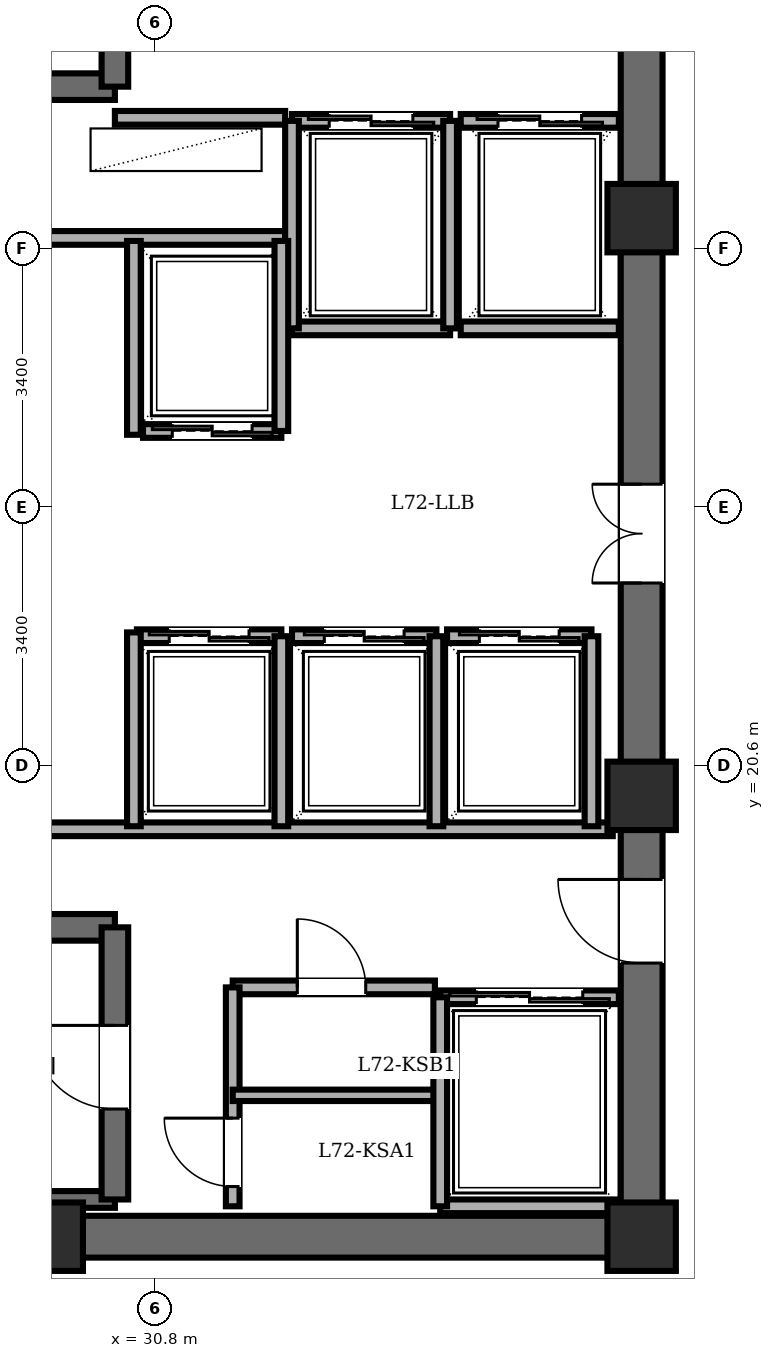
"""IFC4 building model, lengths in metres.
Left out: names, types, materials, properties, quantities, classifications, styles, units other than length and angle.
Written with IfcOpenShell. Run it as: python <this file> out.ifc"""

import sys

from ifc_helpers import new_model, si_unit, direction, frame, frame_2d, origin, origin_2d, place, context, subcontext, project, spatial, rectangle, extrude, element, fill, save


model = new_model("IFC4")
c1 = context("Model", 3, precision=1e-05, world=origin(), true_north=direction((0.0, 1.0)))
c2 = subcontext(c1, "Body", "Model", "MODEL_VIEW")
j1 = project(units=[si_unit("LENGTHUNIT", "METRE"), si_unit("PLANEANGLEUNIT", "RADIAN")], contexts=[c1])
p1 = place(None, origin())
s1 = spatial("IfcSite", under=j1, at=p1, CompositionType="ELEMENT")
p2 = place(p1, origin())
s2 = spatial("IfcBuilding", under=s1, at=p2, CompositionType="ELEMENT")
p3 = place(p2, frame((0.0, 0.0, 277.05)))
s3 = spatial("IfcBuildingStorey", under=s2, at=p3, CompositionType="ELEMENT", Elevation=277.05)
for number, where, z_axis, x_axis in (
    (1, (29.4, 14.4, 0.0), (0.0, 0.0, 1.0), (1.0, 0.0, 0.0)),
    (2, (37.2, 14.4, 0.0), (0.0, 0.0, 1.0), (1.0, 0.0, 0.0)),
    (3, (37.2, 20.2, 0.0), (0.0, 0.0, 1.0), (1.0, 0.0, 0.0)),
    (4, (37.2, 27.8, 0.0), (0.0, 0.0, 1.0), (1.0, 0.0, 0.0)),
):
    element("IfcColumn", number, at=place(p3, frame(where, z_axis=z_axis, x_axis=x_axis)), inside=s3, PredefinedType="COLUMN", context=c2, shape_type="SweptSolid", body=[
        extrude(rectangle(XDim=0.9, YDim=0.9, at=origin_2d()), origin(), (0.0, 0.0, 1.0), 3.65),
    ])
p4 = place(p3, frame((37.2, 14.4, 0.0), z_axis=(0.0, 0.0, 1.0), x_axis=(-1.0, 0.0, 0.0)))
e5 = element("IfcWall", 5, at=p4, inside=s3, PredefinedType="SHEAR", context=c2, shape_type="SweptSolid", body=[
    extrude(rectangle(XDim=15.6, YDim=0.55, at=frame_2d((7.8, 0.0))), origin(), (0.0, 0.0, 1.0), 3.45),
])
p5 = place(p3, frame((37.2, 14.4, 0.0), z_axis=(0.0, 0.0, 1.0), x_axis=(0.0, 1.0, 0.0)))
e6 = element("IfcWall", 6, at=p5, inside=s3, PredefinedType="SHEAR", context=c2, shape_type="SweptSolid", body=[
    extrude(rectangle(XDim=19.2, YDim=0.55, at=frame_2d((9.6, 0.0))), origin(), (0.0, 0.0, 1.0), 3.45),
])
p6 = place(p5, frame((15.8, 0.0, 0.0)))
e7 = element("IfcOpeningElement", 7, at=p6, cuts=e6, PredefinedType="OPENING", context=c2, shape_type="SweptSolid", body=[
    extrude(rectangle(XDim=1.15, YDim=2.15, at=frame_2d((0.575, 1.075))), frame((0.0, 0.285, 0.0), z_axis=(0.0, -1.0, 0.0), x_axis=(1.0, 0.0, 0.0)), (0.0, 0.0, 1.0), 0.57),
])
p7 = place(p5, frame((3.6, 0.0, 0.0)))
e8 = element("IfcOpeningElement", 8, at=p7, cuts=e6, PredefinedType="OPENING", context=c2, shape_type="SweptSolid", body=[
    extrude(rectangle(XDim=1.1, YDim=2.15, at=frame_2d((0.55, 1.075))), frame((0.0, 0.285, 0.0), z_axis=(0.0, -1.0, 0.0), x_axis=(1.0, 0.0, 0.0)), (0.0, 0.0, 1.0), 0.57),
])
p8 = place(p5, frame((8.6, 0.0, 0.0)))
e9 = element("IfcOpeningElement", 9, at=p8, cuts=e6, PredefinedType="OPENING", context=c2, shape_type="SweptSolid", body=[
    extrude(rectangle(XDim=1.3, YDim=2.2, at=frame_2d((0.65, 1.1))), frame((0.0, 0.285, 0.0), z_axis=(0.0, -1.0, 0.0), x_axis=(1.0, 0.0, 0.0)), (0.0, 0.0, 1.0), 0.57),
])
p9 = place(p3, frame((22.48, 29.53, 0.0), z_axis=(0.0, 0.0, 1.0), x_axis=(1.0, 0.0, 0.0)))
e10 = element("IfcWall", 10, at=p9, inside=s3, PredefinedType="SOLIDWALL", context=c2, shape_type="SweptSolid", body=[
    extrude(rectangle(XDim=7.79, YDim=0.35, at=frame_2d((3.895, 0.0))), origin(), (0.0, 0.0, 1.0), 3.45),
])
p10 = place(p3, frame((30.27, 29.53, 0.0), z_axis=(0.0, 0.0, 1.0), x_axis=(0.0, 1.0, 0.0)))
e11 = element("IfcWall", 11, at=p10, inside=s3, PredefinedType="SOLIDWALL", context=c2, shape_type="SweptSolid", body=[
    extrude(rectangle(XDim=3.58, YDim=0.35, at=frame_2d((1.79, 0.0))), origin(), (0.0, 0.0, 1.0), 3.45),
])
p11 = place(p10, frame((1.25, 0.0, 0.0)))
e12 = element("IfcOpeningElement", 12, at=p11, cuts=e11, PredefinedType="OPENING", context=c2, shape_type="SweptSolid", body=[
    extrude(rectangle(XDim=1.1, YDim=2.15, at=frame_2d((0.55, 1.075))), frame((0.0, 0.185, 0.0), z_axis=(0.0, -1.0, 0.0), x_axis=(1.0, 0.0, 0.0)), (0.0, 0.0, 1.0), 0.37),
])
p12 = place(p3, frame((22.48, 18.47, 0.0), z_axis=(0.0, 0.0, 1.0), x_axis=(1.0, 0.0, 0.0)))
e13 = element("IfcWall", 13, at=p12, inside=s3, PredefinedType="SOLIDWALL", context=c2, shape_type="SweptSolid", body=[
    extrude(rectangle(XDim=7.79, YDim=0.35, at=frame_2d((3.895, 0.0))), origin(), (0.0, 0.0, 1.0), 3.45),
])
p13 = place(p3, frame((22.48, 14.89, 0.0), z_axis=(0.0, 0.0, 1.0), x_axis=(1.0, 0.0, 0.0)))
e14 = element("IfcWall", 14, at=p13, inside=s3, PredefinedType="PARTITIONING", context=c2, shape_type="SweptSolid", body=[
    extrude(rectangle(XDim=7.79, YDim=0.22, at=frame_2d((3.895, 0.0))), origin(), (0.0, 0.0, 1.0), 3.45),
])
p14 = place(p3, frame((30.27, 14.89, 0.0), z_axis=(0.0, 0.0, 1.0), x_axis=(0.0, 1.0, 0.0)))
e15 = element("IfcWall", 15, at=p14, inside=s3, PredefinedType="SOLIDWALL", context=c2, shape_type="SweptSolid", body=[
    extrude(rectangle(XDim=3.58, YDim=0.35, at=frame_2d((1.79, 0.0))), origin(), (0.0, 0.0, 1.0), 3.45),
])
p15 = place(p14, frame((1.19, 0.0, 0.0)))
e16 = element("IfcOpeningElement", 16, at=p15, cuts=e15, PredefinedType="OPENING", context=c2, shape_type="SweptSolid", body=[
    extrude(rectangle(XDim=1.1, YDim=2.15, at=frame_2d((0.55, 1.075))), frame((0.0, 0.185, 0.0), z_axis=(0.0, -1.0, 0.0), x_axis=(1.0, 0.0, 0.0)), (0.0, 0.0, 1.0), 0.37),
])
p16 = place(p3, frame((30.27, 29.12, 0.0), z_axis=(0.0, 0.0, 1.0), x_axis=(1.0, 0.0, 0.0)))
e17 = element("IfcWall", 17, at=p16, inside=s3, PredefinedType="PARTITIONING", context=c2, shape_type="SweptSolid", body=[
    extrude(rectangle(XDim=2.24, YDim=0.18, at=frame_2d((1.12, 0.0))), origin(), (0.0, 0.0, 1.0), 3.45),
])
p17 = place(p3, frame((21.95, 27.54, 0.0), z_axis=(0.0, 0.0, 1.0), x_axis=(1.0, 0.0, 0.0)))
e18 = element("IfcWall", 18, at=p17, inside=s3, PredefinedType="PARTITIONING", context=c2, shape_type="SweptSolid", body=[
    extrude(rectangle(XDim=10.56, YDim=0.18, at=frame_2d((5.28, 0.0))), origin(), (0.0, 0.0, 1.0), 3.45),
])
p18 = place(p3, frame((21.95, 19.76, 0.0), z_axis=(0.0, 0.0, 1.0), x_axis=(1.0, 0.0, 0.0)))
e19 = element("IfcWall", 19, at=p18, inside=s3, PredefinedType="PARTITIONING", context=c2, shape_type="SweptSolid", body=[
    extrude(rectangle(XDim=14.87, YDim=0.18, at=frame_2d((7.435, 0.0))), origin(), (0.0, 0.0, 1.0), 3.45),
])
p19 = place(p3, frame((31.82, 17.68, 0.0), z_axis=(0.0, 0.0, 1.0), x_axis=(1.0, 0.0, 0.0)))
e20 = element("IfcWall", 20, at=p19, inside=s3, PredefinedType="PARTITIONING", context=c2, shape_type="SweptSolid", body=[
    extrude(rectangle(XDim=2.66, YDim=0.18, at=frame_2d((1.33, 0.0))), origin(), (0.0, 0.0, 1.0), 3.45),
])
p20 = place(p19, frame((0.85, 0.0, 0.0)))
e21 = element("IfcOpeningElement", 21, at=p20, cuts=e20, PredefinedType="OPENING", context=c2, shape_type="SweptSolid", body=[
    extrude(rectangle(XDim=0.9, YDim=2.05, at=frame_2d((0.45, 1.025))), frame((0.0, 0.1, 0.0), z_axis=(0.0, -1.0, 0.0), x_axis=(1.0, 0.0, 0.0)), (0.0, 0.0, 1.0), 0.2),
])
p21 = place(p3, frame((31.82, 14.8, 0.0), z_axis=(0.0, 0.0, 1.0), x_axis=(0.0, 1.0, 0.0)))
e22 = element("IfcWall", 22, at=p21, inside=s3, PredefinedType="PARTITIONING", context=c2, shape_type="SweptSolid", body=[
    extrude(rectangle(XDim=2.88, YDim=0.18, at=frame_2d((1.44, 0.0))), origin(), (0.0, 0.0, 1.0), 3.45),
])
p22 = place(p21, frame((0.26, 0.0, 0.0)))
e23 = element("IfcOpeningElement", 23, at=p22, cuts=e22, PredefinedType="OPENING", context=c2, shape_type="SweptSolid", body=[
    extrude(rectangle(XDim=0.9, YDim=2.05, at=frame_2d((0.45, 1.025))), frame((0.0, 0.1, 0.0), z_axis=(0.0, -1.0, 0.0), x_axis=(1.0, 0.0, 0.0)), (0.0, 0.0, 1.0), 0.2),
])
p23 = place(p3, frame((31.82, 16.26, 0.0), z_axis=(0.0, 0.0, 1.0), x_axis=(1.0, 0.0, 0.0)))
e24 = element("IfcWall", 24, at=p23, inside=s3, PredefinedType="PARTITIONING", context=c2, shape_type="SweptSolid", body=[
    extrude(rectangle(XDim=2.66, YDim=0.15, at=frame_2d((1.33, 0.0))), origin(), (0.0, 0.0, 1.0), 3.45),
])
p24 = place(p3, frame((32.6, 29.08, 0.0), z_axis=(0.0, 0.0, 1.0), x_axis=(1.0, 0.0, 0.0)))
e25 = element("IfcWall", 25, at=p24, inside=s3, PredefinedType="PARTITIONING", context=c2, shape_type="SweptSolid", body=[
    extrude(rectangle(XDim=2.08, YDim=0.18, at=frame_2d((1.04, 0.0))), origin(), (0.0, 0.0, 1.0), 3.45),
])
p25 = place(p24, frame((0.49, 0.0, 0.0)))
e26 = element("IfcOpeningElement", 26, at=p25, cuts=e25, PredefinedType="OPENING", context=c2, shape_type="SweptSolid", body=[
    extrude(rectangle(XDim=1.1, YDim=2.2, at=frame_2d((0.55, 1.1))), frame((0.0, 0.1, 0.0), z_axis=(0.0, -1.0, 0.0), x_axis=(1.0, 0.0, 0.0)), (0.0, 0.0, 1.0), 0.2),
])
p26 = place(p3, frame((34.68, 26.35, 0.0), z_axis=(0.0, 0.0, 1.0), x_axis=(-1.0, 0.0, 0.0)))
e27 = element("IfcWall", 27, at=p26, inside=s3, PredefinedType="PARTITIONING", context=c2, shape_type="SweptSolid", body=[
    extrude(rectangle(XDim=2.08, YDim=0.18, at=frame_2d((1.04, 0.0))), origin(), (0.0, 0.0, 1.0), 3.45),
])
for number, where, z_axis, x_axis in (
    (28, (34.68, 26.35, 0.0), (0.0, 0.0, 1.0), (0.0, 1.0, 0.0)),
    (29, (32.6, 29.08, 0.0), (0.0, 0.0, 1.0), (0.0, -1.0, 0.0)),
):
    element("IfcWall", number, at=place(p3, frame(where, z_axis=z_axis, x_axis=x_axis)), inside=s3, PredefinedType="PARTITIONING", context=c2, shape_type="SweptSolid", body=[
        extrude(rectangle(XDim=2.73, YDim=0.18, at=frame_2d((1.365, 0.0))), origin(), (0.0, 0.0, 1.0), 3.45),
    ])
p27 = place(p3, frame((34.82, 29.08, 0.0), z_axis=(0.0, 0.0, 1.0), x_axis=(1.0, 0.0, 0.0)))
e30 = element("IfcWall", 30, at=p27, inside=s3, PredefinedType="PARTITIONING", context=c2, shape_type="SweptSolid", body=[
    extrude(rectangle(XDim=2.08, YDim=0.18, at=frame_2d((1.04, 0.0))), origin(), (0.0, 0.0, 1.0), 3.45),
])
p28 = place(p27, frame((0.49, 0.0, 0.0)))
e31 = element("IfcOpeningElement", 31, at=p28, cuts=e30, PredefinedType="OPENING", context=c2, shape_type="SweptSolid", body=[
    extrude(rectangle(XDim=1.1, YDim=2.2, at=frame_2d((0.55, 1.1))), frame((0.0, 0.1, 0.0), z_axis=(0.0, -1.0, 0.0), x_axis=(1.0, 0.0, 0.0)), (0.0, 0.0, 1.0), 0.2),
])
p29 = place(p3, frame((36.9, 26.35, 0.0), z_axis=(0.0, 0.0, 1.0), x_axis=(-1.0, 0.0, 0.0)))
e32 = element("IfcWall", 32, at=p29, inside=s3, PredefinedType="PARTITIONING", context=c2, shape_type="SweptSolid", body=[
    extrude(rectangle(XDim=2.08, YDim=0.18, at=frame_2d((1.04, 0.0))), origin(), (0.0, 0.0, 1.0), 3.45),
])
p30 = place(p3, frame((34.55, 17.55, 0.0), z_axis=(0.0, 0.0, 1.0), x_axis=(1.0, 0.0, 0.0)))
e33 = element("IfcWall", 33, at=p30, inside=s3, PredefinedType="PARTITIONING", context=c2, shape_type="SweptSolid", body=[
    extrude(rectangle(XDim=2.35, YDim=0.18, at=frame_2d((1.175, 0.0))), origin(), (0.0, 0.0, 1.0), 3.45),
])
p31 = place(p30, frame((0.475, 0.0, 0.0)))
e34 = element("IfcOpeningElement", 34, at=p31, cuts=e33, PredefinedType="OPENING", context=c2, shape_type="SweptSolid", body=[
    extrude(rectangle(XDim=1.4, YDim=2.3, at=frame_2d((0.7, 1.15))), frame((0.0, 0.1, 0.0), z_axis=(0.0, -1.0, 0.0), x_axis=(1.0, 0.0, 0.0)), (0.0, 0.0, 1.0), 0.2),
])
p32 = place(p3, frame((36.9, 14.8, 0.0), z_axis=(0.0, 0.0, 1.0), x_axis=(-1.0, 0.0, 0.0)))
e35 = element("IfcWall", 35, at=p32, inside=s3, PredefinedType="PARTITIONING", context=c2, shape_type="SweptSolid", body=[
    extrude(rectangle(XDim=2.35, YDim=0.18, at=frame_2d((1.175, 0.0))), origin(), (0.0, 0.0, 1.0), 3.45),
])
p33 = place(p3, frame((34.55, 17.55, 0.0), z_axis=(0.0, 0.0, 1.0), x_axis=(0.0, -1.0, 0.0)))
e36 = element("IfcWall", 36, at=p33, inside=s3, PredefinedType="PARTITIONING", context=c2, shape_type="SweptSolid", body=[
    extrude(rectangle(XDim=2.75, YDim=0.18, at=frame_2d((1.375, 0.0))), origin(), (0.0, 0.0, 1.0), 3.45),
])
p34 = place(p3, frame((32.46, 25.0, 0.0), z_axis=(0.0, 0.0, 1.0), x_axis=(-1.0, 0.0, 0.0)))
e37 = element("IfcWall", 37, at=p34, inside=s3, PredefinedType="PARTITIONING", context=c2, shape_type="SweptSolid", body=[
    extrude(rectangle(XDim=1.82, YDim=0.18, at=frame_2d((0.91, 0.0))), origin(), (0.0, 0.0, 1.0), 3.45),
])
p35 = place(p34, frame((0.385, 0.0, 0.0)))
e38 = element("IfcOpeningElement", 38, at=p35, cuts=e37, PredefinedType="OPENING", context=c2, shape_type="SweptSolid", body=[
    extrude(rectangle(XDim=1.05, YDim=2.2, at=frame_2d((0.525, 1.1))), frame((0.0, 0.1, 0.0), z_axis=(0.0, -1.0, 0.0), x_axis=(1.0, 0.0, 0.0)), (0.0, 0.0, 1.0), 0.2),
])
p36 = place(p3, frame((32.46, 25.0, 0.0), z_axis=(0.0, 0.0, 1.0), x_axis=(0.0, 1.0, 0.0)))
e39 = element("IfcWall", 39, at=p36, inside=s3, PredefinedType="PARTITIONING", context=c2, shape_type="SweptSolid", body=[
    extrude(rectangle(XDim=2.5, YDim=0.18, at=frame_2d((1.25, 0.0))), origin(), (0.0, 0.0, 1.0), 3.45),
])
p37 = place(p3, frame((30.56, 22.3, 0.0), z_axis=(0.0, 0.0, 1.0), x_axis=(1.0, 0.0, 0.0)))
e40 = element("IfcWall", 40, at=p37, inside=s3, PredefinedType="PARTITIONING", context=c2, shape_type="SweptSolid", body=[
    extrude(rectangle(XDim=1.9, YDim=0.18, at=frame_2d((0.95, 0.0))), origin(), (0.0, 0.0, 1.0), 3.45),
])
p38 = place(p37, frame((0.425, 0.0, 0.0)))
e41 = element("IfcOpeningElement", 41, at=p38, cuts=e40, PredefinedType="OPENING", context=c2, shape_type="SweptSolid", body=[
    extrude(rectangle(XDim=1.05, YDim=2.2, at=frame_2d((0.525, 1.1))), frame((0.0, 0.1, 0.0), z_axis=(0.0, -1.0, 0.0), x_axis=(1.0, 0.0, 0.0)), (0.0, 0.0, 1.0), 0.2),
])
p39 = place(p3, frame((32.46, 19.8, 0.0), z_axis=(0.0, 0.0, 1.0), x_axis=(0.0, 1.0, 0.0)))
e42 = element("IfcWall", 42, at=p39, inside=s3, PredefinedType="PARTITIONING", context=c2, shape_type="SweptSolid", body=[
    extrude(rectangle(XDim=2.5, YDim=0.18, at=frame_2d((1.25, 0.0))), origin(), (0.0, 0.0, 1.0), 3.45),
])
p40 = place(p3, frame((32.6, 22.3, 0.0), z_axis=(0.0, 0.0, 1.0), x_axis=(1.0, 0.0, 0.0)))
e43 = element("IfcWall", 43, at=p40, inside=s3, PredefinedType="PARTITIONING", context=c2, shape_type="SweptSolid", body=[
    extrude(rectangle(XDim=1.9, YDim=0.18, at=frame_2d((0.95, 0.0))), origin(), (0.0, 0.0, 1.0), 3.45),
])
p41 = place(p40, frame((0.425, 0.0, 0.0)))
e44 = element("IfcOpeningElement", 44, at=p41, cuts=e43, PredefinedType="OPENING", context=c2, shape_type="SweptSolid", body=[
    extrude(rectangle(XDim=1.05, YDim=2.2, at=frame_2d((0.525, 1.1))), frame((0.0, 0.1, 0.0), z_axis=(0.0, -1.0, 0.0), x_axis=(1.0, 0.0, 0.0)), (0.0, 0.0, 1.0), 0.2),
])
p42 = place(p3, frame((34.5, 19.8, 0.0), z_axis=(0.0, 0.0, 1.0), x_axis=(0.0, 1.0, 0.0)))
e45 = element("IfcWall", 45, at=p42, inside=s3, PredefinedType="PARTITIONING", context=c2, shape_type="SweptSolid", body=[
    extrude(rectangle(XDim=2.5, YDim=0.18, at=frame_2d((1.25, 0.0))), origin(), (0.0, 0.0, 1.0), 3.45),
])
p43 = place(p3, frame((34.64, 22.3, 0.0), z_axis=(0.0, 0.0, 1.0), x_axis=(1.0, 0.0, 0.0)))
e46 = element("IfcWall", 46, at=p43, inside=s3, PredefinedType="PARTITIONING", context=c2, shape_type="SweptSolid", body=[
    extrude(rectangle(XDim=1.9, YDim=0.18, at=frame_2d((0.95, 0.0))), origin(), (0.0, 0.0, 1.0), 3.45),
])
p44 = place(p43, frame((0.425, 0.0, 0.0)))
e47 = element("IfcOpeningElement", 47, at=p44, cuts=e46, PredefinedType="OPENING", context=c2, shape_type="SweptSolid", body=[
    extrude(rectangle(XDim=1.05, YDim=2.2, at=frame_2d((0.525, 1.1))), frame((0.0, 0.1, 0.0), z_axis=(0.0, -1.0, 0.0), x_axis=(1.0, 0.0, 0.0)), (0.0, 0.0, 1.0), 0.2),
])
p45 = place(p3, frame((36.54, 19.8, 0.0), z_axis=(0.0, 0.0, 1.0), x_axis=(0.0, 1.0, 0.0)))
e48 = element("IfcWall", 48, at=p45, inside=s3, PredefinedType="PARTITIONING", context=c2, shape_type="SweptSolid", body=[
    extrude(rectangle(XDim=2.5, YDim=0.18, at=frame_2d((1.25, 0.0))), origin(), (0.0, 0.0, 1.0), 3.45),
])
for number, where, z_axis, x_axis in (
    (49, (30.52, 24.95, 0.0), (0.0, 0.0, 1.0), (0.0, 1.0, 0.0)),
    (50, (30.52, 19.8, 0.0), (0.0, 0.0, 1.0), (0.0, 1.0, 0.0)),
):
    element("IfcWall", number, at=place(p3, frame(where, z_axis=z_axis, x_axis=x_axis)), inside=s3, PredefinedType="PARTITIONING", context=c2, shape_type="SweptSolid", body=[
        extrude(rectangle(XDim=2.55, YDim=0.18, at=frame_2d((1.275, 0.0))), origin(), (0.0, 0.0, 1.0), 3.45),
    ])
p46 = place(p15, origin())
e51 = element("IfcDoor", 51, at=p46, inside=s3, OperationType="SINGLE_SWING_RIGHT", PredefinedType="DOOR", context=c2, shape_type="SweptSolid", body=[
    extrude(rectangle(XDim=1.1, YDim=2.15, at=frame_2d((0.55, 1.075))), frame((0.0, 0.025, 0.0), z_axis=(0.0, -1.0, 0.0), x_axis=(1.0, 0.0, 0.0)), (0.0, 0.0, 1.0), 0.05),
])
fill(e16, e51)
p47 = place(p7, origin())
e52 = element("IfcDoor", 52, at=p47, inside=s3, OperationType="SINGLE_SWING_RIGHT", PredefinedType="DOOR", context=c2, shape_type="SweptSolid", body=[
    extrude(rectangle(XDim=1.1, YDim=2.15, at=frame_2d((0.55, 1.075))), frame((0.0, 0.025, 0.0), z_axis=(0.0, -1.0, 0.0), x_axis=(1.0, 0.0, 0.0)), (0.0, 0.0, 1.0), 0.05),
])
fill(e8, e52)
p48 = place(p20, origin())
e53 = element("IfcDoor", 53, at=p48, inside=s3, OperationType="SINGLE_SWING_LEFT", PredefinedType="DOOR", context=c2, shape_type="SweptSolid", body=[
    extrude(rectangle(XDim=0.9, YDim=2.05, at=frame_2d((0.45, 1.025))), frame((0.0, 0.025, 0.0), z_axis=(0.0, -1.0, 0.0), x_axis=(1.0, 0.0, 0.0)), (0.0, 0.0, 1.0), 0.05),
])
fill(e21, e53)
p49 = place(p22, origin())
e54 = element("IfcDoor", 54, at=p49, inside=s3, OperationType="SINGLE_SWING_RIGHT", PredefinedType="DOOR", context=c2, shape_type="SweptSolid", body=[
    extrude(rectangle(XDim=0.9, YDim=2.05, at=frame_2d((0.45, 1.025))), frame((0.0, 0.025, 0.0), z_axis=(0.0, -1.0, 0.0), x_axis=(1.0, 0.0, 0.0)), (0.0, 0.0, 1.0), 0.05),
])
fill(e23, e54)
p50 = place(p25, origin())
e55 = element("IfcDoor", 55, at=p50, inside=s3, OperationType="DOUBLE_DOOR_SLIDING", PredefinedType="DOOR", context=c2, shape_type="SweptSolid", body=[
    extrude(rectangle(XDim=1.1, YDim=2.2, at=frame_2d((0.55, 1.1))), frame((0.0, 0.025, 0.0), z_axis=(0.0, -1.0, 0.0), x_axis=(1.0, 0.0, 0.0)), (0.0, 0.0, 1.0), 0.05),
])
fill(e26, e55)
p51 = place(p28, origin())
e56 = element("IfcDoor", 56, at=p51, inside=s3, OperationType="DOUBLE_DOOR_SLIDING", PredefinedType="DOOR", context=c2, shape_type="SweptSolid", body=[
    extrude(rectangle(XDim=1.1, YDim=2.2, at=frame_2d((0.55, 1.1))), frame((0.0, 0.025, 0.0), z_axis=(0.0, -1.0, 0.0), x_axis=(1.0, 0.0, 0.0)), (0.0, 0.0, 1.0), 0.05),
])
fill(e31, e56)
p52 = place(p31, origin())
e57 = element("IfcDoor", 57, at=p52, inside=s3, OperationType="DOUBLE_DOOR_SLIDING", PredefinedType="DOOR", context=c2, shape_type="SweptSolid", body=[
    extrude(rectangle(XDim=1.4, YDim=2.3, at=frame_2d((0.7, 1.15))), frame((0.0, 0.025, 0.0), z_axis=(0.0, -1.0, 0.0), x_axis=(1.0, 0.0, 0.0)), (0.0, 0.0, 1.0), 0.05),
])
fill(e34, e57)
p53 = place(p35, origin())
e58 = element("IfcDoor", 58, at=p53, inside=s3, OperationType="DOUBLE_DOOR_SLIDING", PredefinedType="DOOR", context=c2, shape_type="SweptSolid", body=[
    extrude(rectangle(XDim=1.05, YDim=2.2, at=frame_2d((0.525, 1.1))), frame((0.0, 0.025, 0.0), z_axis=(0.0, -1.0, 0.0), x_axis=(1.0, 0.0, 0.0)), (0.0, 0.0, 1.0), 0.05),
])
fill(e38, e58)
p54 = place(p38, origin())
e59 = element("IfcDoor", 59, at=p54, inside=s3, OperationType="DOUBLE_DOOR_SLIDING", PredefinedType="DOOR", context=c2, shape_type="SweptSolid", body=[
    extrude(rectangle(XDim=1.05, YDim=2.2, at=frame_2d((0.525, 1.1))), frame((0.0, 0.025, 0.0), z_axis=(0.0, -1.0, 0.0), x_axis=(1.0, 0.0, 0.0)), (0.0, 0.0, 1.0), 0.05),
])
fill(e41, e59)
p55 = place(p41, origin())
e60 = element("IfcDoor", 60, at=p55, inside=s3, OperationType="DOUBLE_DOOR_SLIDING", PredefinedType="DOOR", context=c2, shape_type="SweptSolid", body=[
    extrude(rectangle(XDim=1.05, YDim=2.2, at=frame_2d((0.525, 1.1))), frame((0.0, 0.025, 0.0), z_axis=(0.0, -1.0, 0.0), x_axis=(1.0, 0.0, 0.0)), (0.0, 0.0, 1.0), 0.05),
])
fill(e44, e60)
p56 = place(p44, origin())
e61 = element("IfcDoor", 61, at=p56, inside=s3, OperationType="DOUBLE_DOOR_SLIDING", PredefinedType="DOOR", context=c2, shape_type="SweptSolid", body=[
    extrude(rectangle(XDim=1.05, YDim=2.2, at=frame_2d((0.525, 1.1))), frame((0.0, 0.025, 0.0), z_axis=(0.0, -1.0, 0.0), x_axis=(1.0, 0.0, 0.0)), (0.0, 0.0, 1.0), 0.05),
])
fill(e47, e61)
p57 = place(p8, origin())
e62 = element("IfcDoor", 62, at=p57, inside=s3, OperationType="DOUBLE_DOOR_SINGLE_SWING", PredefinedType="DOOR", context=c2, shape_type="SweptSolid", body=[
    extrude(rectangle(XDim=1.3, YDim=2.2, at=frame_2d((0.65, 1.1))), frame((0.0, 0.025, 0.0), z_axis=(0.0, -1.0, 0.0), x_axis=(1.0, 0.0, 0.0)), (0.0, 0.0, 1.0), 0.05),
])
fill(e9, e62)
save(model, sys.argv[1])
